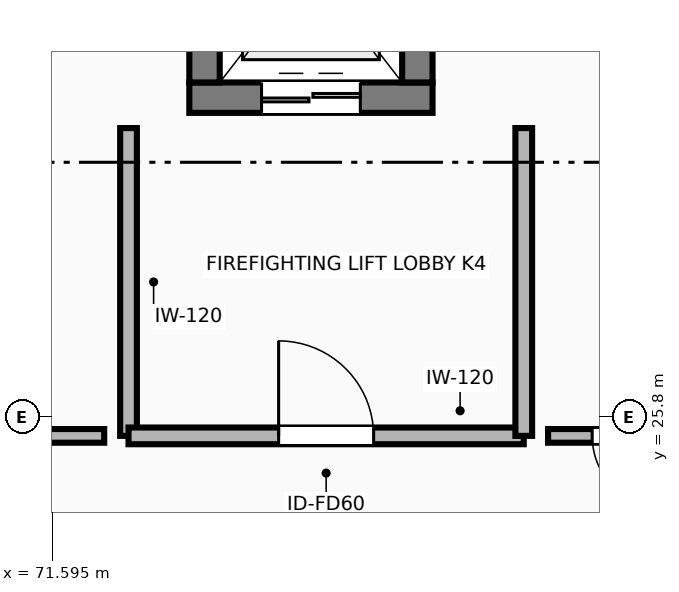
"""IFC4 building model, lengths in metres.
Left out: names, types, materials, properties, quantities, classifications, styles, units other than length and angle.
Written with IfcOpenShell. Run it as: python <this file> out.ifc"""

import sys

from ifc_helpers import new_model, si_unit, direction, frame, frame_2d, origin, place, context, subcontext, project, spatial, rectangle, extrude, element, fill, save


model = new_model("IFC4")
c1 = context("Model", 3, precision=1e-05, world=origin(), true_north=direction((0.0, 1.0)))
c2 = subcontext(c1, "Body", "Model", "MODEL_VIEW")
j1 = project(units=[si_unit("LENGTHUNIT", "METRE"), si_unit("PLANEANGLEUNIT", "RADIAN")], contexts=[c1])
p1 = place(None, origin())
s1 = spatial("IfcSite", under=j1, at=p1, CompositionType="ELEMENT")
p2 = place(p1, origin())
s2 = spatial("IfcBuilding", under=s1, at=p2, CompositionType="ELEMENT")
p3 = place(p2, origin())
s3 = spatial("IfcBuildingStorey", under=s2, at=p3, CompositionType="ELEMENT", Elevation=0.0)
p4 = place(p3, frame((73.4, 30.0, 0.0), z_axis=(0.0, 0.0, 1.0), x_axis=(1.0, 0.0, 0.0)))
e1 = element("IfcWall", 1, at=p4, inside=s3, PredefinedType="SHEAR", context=c2, shape_type="SweptSolid", body=[
    extrude(rectangle(XDim=3.2, YDim=0.4, at=frame_2d((1.6, 0.0))), origin(), (0.0, 0.0, 1.0), 5.4),
])
p5 = place(p4, frame((0.95, 0.0, 0.0)))
e2 = element("IfcOpeningElement", 2, at=p5, cuts=e1, PredefinedType="OPENING", context=c2, shape_type="SweptSolid", body=[
    extrude(rectangle(XDim=1.3, YDim=2.25, at=frame_2d((0.65, 1.125))), frame((0.0, 0.21, 0.0), z_axis=(0.0, -1.0, 0.0), x_axis=(1.0, 0.0, 0.0)), (0.0, 0.0, 1.0), 0.42),
])
for number, where, z_axis, x_axis in (
    (3, (73.6, 30.2, 0.0), (0.0, 0.0, 1.0), (0.0, 1.0, 0.0)),
    (4, (76.4, 33.3, 0.0), (0.0, 0.0, 1.0), (0.0, -1.0, 0.0)),
):
    element("IfcWall", number, at=place(p3, frame(where, z_axis=z_axis, x_axis=x_axis)), inside=s3, PredefinedType="SHEAR", context=c2, shape_type="SweptSolid", body=[
        extrude(rectangle(XDim=3.1, YDim=0.4, at=frame_2d((1.55, 0.0))), origin(), (0.0, 0.0, 1.0), 5.4),
    ])
p6 = place(p3, frame((72.6, 29.6, 0.0), z_axis=(0.0, 0.0, 1.0), x_axis=(0.0, -1.0, 0.0)))
e5 = element("IfcWall", 5, at=p6, inside=s3, PredefinedType="PARTITIONING", context=c2, shape_type="SweptSolid", body=[
    extrude(rectangle(XDim=4.05, YDim=0.22, at=frame_2d((2.025, 0.0))), origin(), (0.0, 0.0, 1.0), 5.12),
])
p7 = place(p3, frame((72.6, 25.55, 0.0), z_axis=(0.0, 0.0, 1.0), x_axis=(1.0, 0.0, 0.0)))
e6 = element("IfcWall", 6, at=p7, inside=s3, PredefinedType="PARTITIONING", context=c2, shape_type="SweptSolid", body=[
    extrude(rectangle(XDim=5.2, YDim=0.22, at=frame_2d((2.6, 0.0))), origin(), (0.0, 0.0, 1.0), 4.455),
])
p8 = place(p7, frame((1.975, 0.0, 0.0)))
e7 = element("IfcOpeningElement", 7, at=p8, cuts=e6, PredefinedType="OPENING", context=c2, shape_type="SweptSolid", body=[
    extrude(rectangle(XDim=1.25, YDim=2.2, at=frame_2d((0.625, 1.1))), frame((0.0, 0.12, 0.0), z_axis=(0.0, -1.0, 0.0), x_axis=(1.0, 0.0, 0.0)), (0.0, 0.0, 1.0), 0.24),
])
p9 = place(p3, frame((77.8, 25.55, 0.0), z_axis=(0.0, 0.0, 1.0), x_axis=(0.0, 1.0, 0.0)))
e8 = element("IfcWall", 8, at=p9, inside=s3, PredefinedType="PARTITIONING", context=c2, shape_type="SweptSolid", body=[
    extrude(rectangle(XDim=4.05, YDim=0.22, at=frame_2d((2.025, 0.0))), origin(), (0.0, 0.0, 1.0), 4.788),
])
p10 = place(p3, frame((72.28, 25.55, 0.0), z_axis=(0.0, 0.0, 1.0), x_axis=(-1.0, 0.0, 0.0)))
e9 = element("IfcWall", 9, at=p10, inside=s3, PredefinedType="PARTITIONING", context=c2, shape_type="SweptSolid", body=[
    extrude(rectangle(XDim=2.3, YDim=0.18, at=frame_2d((1.15, 0.0))), origin(), (0.0, 0.0, 1.0), 4.455),
])
p11 = place(p3, frame((80.24, 25.55, 0.0), z_axis=(0.0, 0.0, 1.0), x_axis=(-1.0, 0.0, 0.0)))
e10 = element("IfcWall", 10, at=p11, inside=s3, PredefinedType="PARTITIONING", context=c2, shape_type="SweptSolid", body=[
    extrude(rectangle(XDim=2.12, YDim=0.18, at=frame_2d((1.06, 0.0))), origin(), (0.0, 0.0, 1.0), 4.455),
])
p12 = place(p11, frame((0.58, 0.0, 0.0)))
e11 = element("IfcOpeningElement", 11, at=p12, cuts=e10, PredefinedType="OPENING", context=c2, shape_type="SweptSolid", body=[
    extrude(rectangle(XDim=0.96, YDim=2.1, at=frame_2d((0.48, 1.05))), frame((0.0, 0.1, 0.0), z_axis=(0.0, -1.0, 0.0), x_axis=(1.0, 0.0, 0.0)), (0.0, 0.0, 1.0), 0.2),
])
p13 = place(p5, origin())
e12 = element("IfcDoor", 12, at=p13, inside=s3, OperationType="DOUBLE_DOOR_SLIDING", PredefinedType="DOOR", context=c2, shape_type="SweptSolid", body=[
    extrude(rectangle(XDim=1.3, YDim=2.25, at=frame_2d((0.65, 1.125))), frame((0.0, 0.025, 0.0), z_axis=(0.0, -1.0, 0.0), x_axis=(1.0, 0.0, 0.0)), (0.0, 0.0, 1.0), 0.05),
])
fill(e2, e12)
p14 = place(p8, origin())
e13 = element("IfcDoor", 13, at=p14, inside=s3, OperationType="SINGLE_SWING_LEFT", PredefinedType="DOOR", context=c2, shape_type="SweptSolid", body=[
    extrude(rectangle(XDim=1.25, YDim=2.2, at=frame_2d((0.625, 1.1))), frame((0.0, 0.025, 0.0), z_axis=(0.0, -1.0, 0.0), x_axis=(1.0, 0.0, 0.0)), (0.0, 0.0, 1.0), 0.05),
])
fill(e7, e13)
p15 = place(p12, origin())
e14 = element("IfcDoor", 14, at=p15, inside=s3, OperationType="SINGLE_SWING_LEFT", PredefinedType="DOOR", context=c2, shape_type="SweptSolid", body=[
    extrude(rectangle(XDim=0.96, YDim=2.1, at=frame_2d((0.48, 1.05))), frame((0.0, 0.025, 0.0), z_axis=(0.0, -1.0, 0.0), x_axis=(1.0, 0.0, 0.0)), (0.0, 0.0, 1.0), 0.05),
])
fill(e11, e14)
save(model, sys.argv[1])
